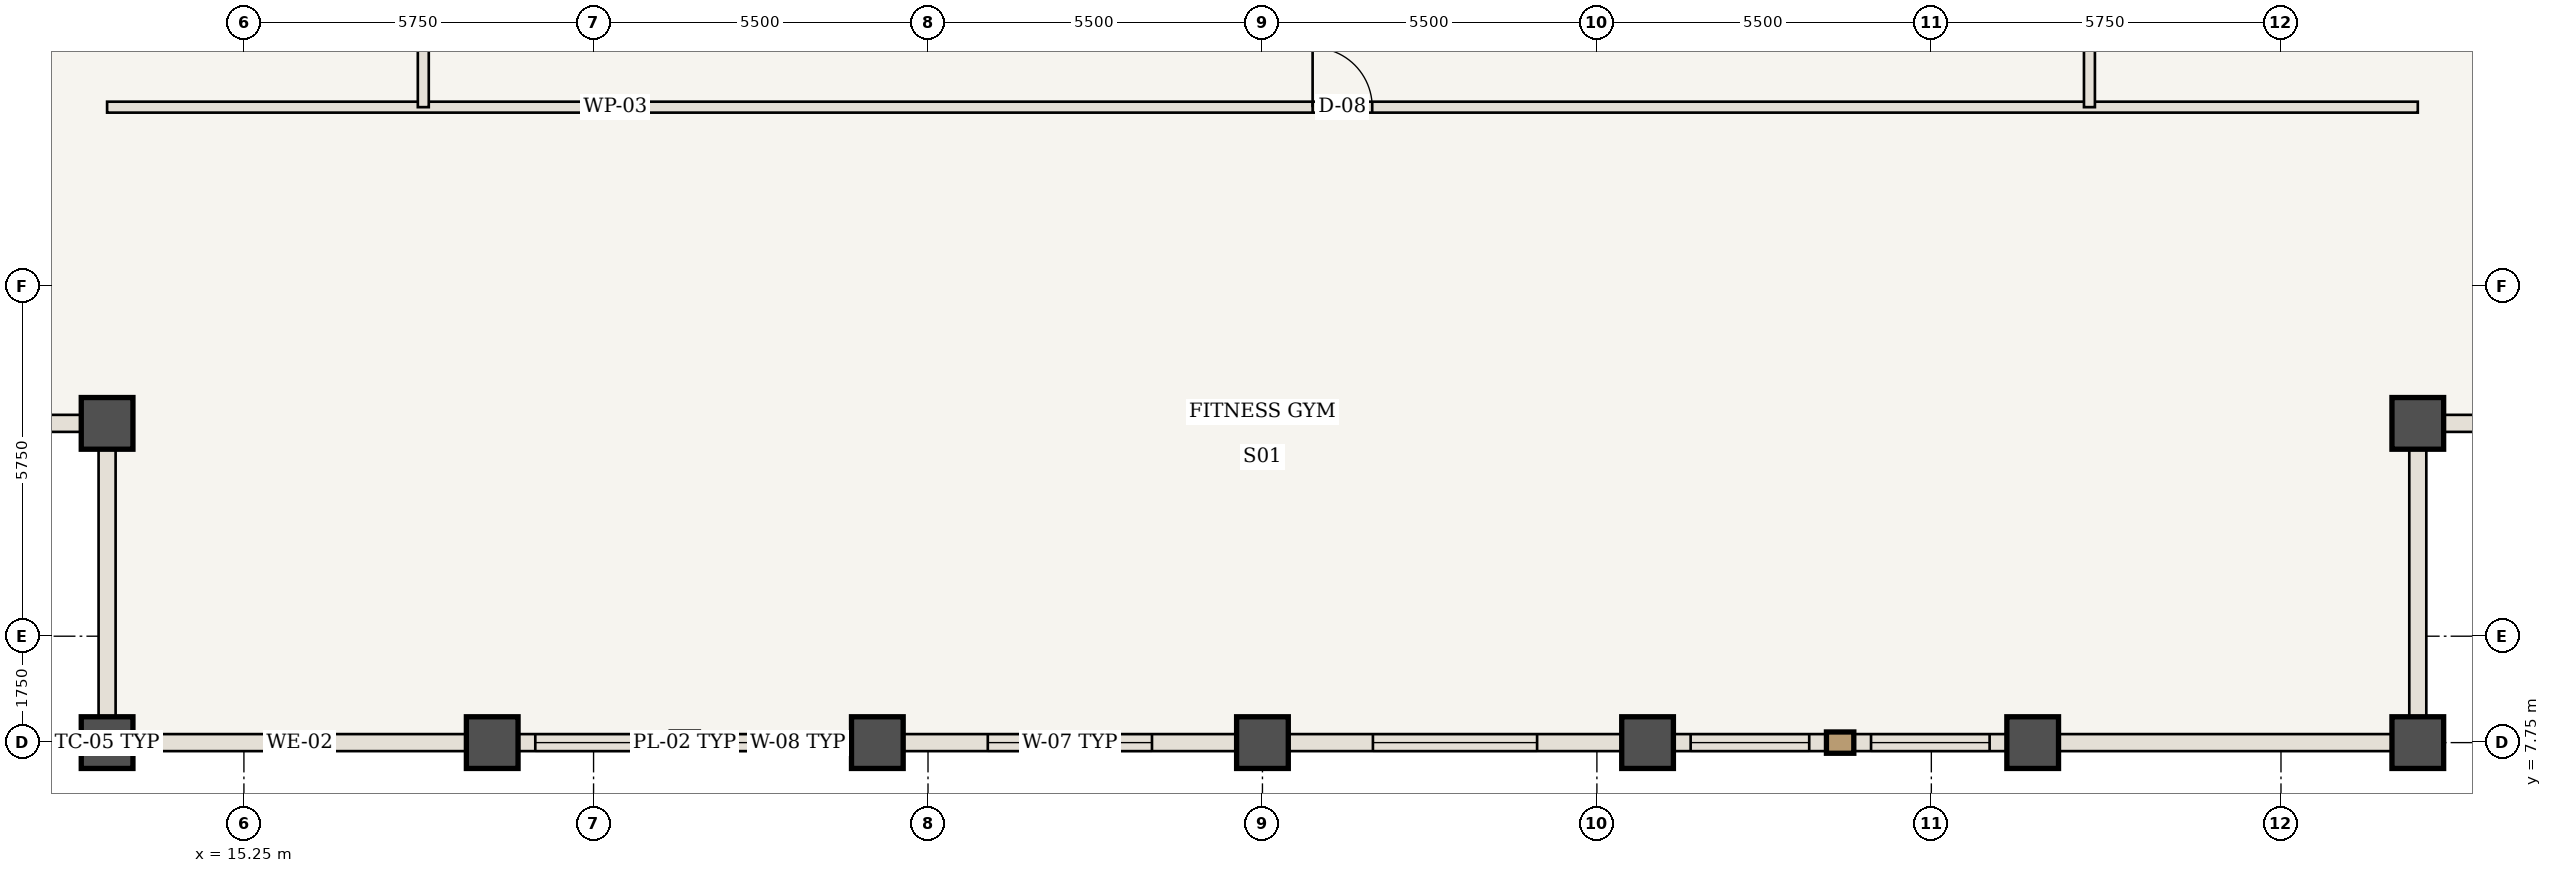
"""IFC4 building model, lengths in metres.
Left out: names, types, materials, properties, quantities, classifications, styles, units other than length and angle.
Written with IfcOpenShell. Run it as: python <this file> out.ifc"""

import sys

from ifc_helpers import new_model, si_unit, direction, frame, frame_2d, origin, origin_2d, place, context, subcontext, project, spatial, rectangle, extrude, element, fill, save


model = new_model("IFC4")
c1 = context("Model", 3, precision=1e-05, world=origin(), true_north=direction((0.0, 1.0)))
c2 = subcontext(c1, "Body", "Model", "MODEL_VIEW")
j1 = project(units=[si_unit("LENGTHUNIT", "METRE"), si_unit("PLANEANGLEUNIT", "RADIAN")], contexts=[c1])
p1 = place(None, origin())
s1 = spatial("IfcSite", under=j1, at=p1, CompositionType="ELEMENT")
p2 = place(p1, origin())
s2 = spatial("IfcBuilding", under=s1, at=p2, CompositionType="ELEMENT")
p3 = place(p2, frame((0.0, 0.0, 248.5)))
s3 = spatial("IfcBuildingStorey", under=s2, at=p3, CompositionType="ELEMENT", Elevation=248.5)
for number, where, z_axis, x_axis in (
    (1, (13.0, 7.75, 0.0), (0.0, 0.0, 1.0), (1.0, 0.0, 0.0)),
    (2, (13.0, 13.0, 0.0), (0.0, 0.0, 1.0), (1.0, 0.0, 0.0)),
    (3, (51.0, 7.75, 0.0), (0.0, 0.0, 1.0), (1.0, 0.0, 0.0)),
    (4, (51.0, 13.0, 0.0), (0.0, 0.0, 1.0), (1.0, 0.0, 0.0)),
    (5, (19.333, 7.75, 0.0), (0.0, 0.0, 1.0), (1.0, 0.0, 0.0)),
    (6, (25.667, 7.75, 0.0), (0.0, 0.0, 1.0), (1.0, 0.0, 0.0)),
    (7, (32.0, 7.75, 0.0), (0.0, 0.0, 1.0), (1.0, 0.0, 0.0)),
    (8, (38.333, 7.75, 0.0), (0.0, 0.0, 1.0), (1.0, 0.0, 0.0)),
    (9, (44.667, 7.75, 0.0), (0.0, 0.0, 1.0), (1.0, 0.0, 0.0)),
):
    element("IfcColumn", number, at=place(p3, frame(where, z_axis=z_axis, x_axis=x_axis)), inside=s3, PredefinedType="COLUMN", context=c2, shape_type="SweptSolid", body=[
        extrude(rectangle(XDim=0.85, YDim=0.85, at=origin_2d()), origin(), (0.0, 0.0, 1.0), 3.85),
    ])
p4 = place(p3, frame((13.0, 18.2, 0.0), z_axis=(0.0, 0.0, 1.0), x_axis=(1.0, 0.0, 0.0)))
e10 = element("IfcWall", 10, at=p4, inside=s3, PredefinedType="STANDARD", context=c2, shape_type="SweptSolid", body=[
    extrude(rectangle(XDim=38.0, YDim=0.18, at=frame_2d((19.0, 0.0))), origin(), (0.0, 0.0, 1.0), 3.43),
])
p5 = place(p4, frame((19.825, 0.0, 0.0)))
e11 = element("IfcOpeningElement", 11, at=p5, cuts=e10, PredefinedType="OPENING", context=c2, shape_type="SweptSolid", body=[
    extrude(rectangle(XDim=0.98, YDim=2.2, at=frame_2d((0.49, 1.1))), frame((0.0, 0.1, 0.0), z_axis=(0.0, -1.0, 0.0), x_axis=(1.0, 0.0, 0.0)), (0.0, 0.0, 1.0), 0.2),
])
p6 = place(p3, frame((18.2, 18.2, 0.0), z_axis=(0.0, 0.0, 1.0), x_axis=(0.0, 1.0, 0.0)))
e12 = element("IfcWall", 12, at=p6, inside=s3, PredefinedType="STANDARD", context=c2, shape_type="SweptSolid", body=[
    extrude(rectangle(XDim=27.6, YDim=0.18, at=frame_2d((13.8, 0.0))), origin(), (0.0, 0.0, 1.0), 3.43),
])
p7 = place(p6, frame((14.75, 0.0, 0.0)))
e13 = element("IfcOpeningElement", 13, at=p7, cuts=e12, PredefinedType="OPENING", context=c2, shape_type="SweptSolid", body=[
    extrude(rectangle(XDim=0.98, YDim=2.2, at=frame_2d((0.49, 1.1))), frame((0.0, 0.1, 0.0), z_axis=(0.0, -1.0, 0.0), x_axis=(1.0, 0.0, 0.0)), (0.0, 0.0, 1.0), 0.2),
])
p8 = place(p3, frame((45.6, 18.2, 0.0), z_axis=(0.0, 0.0, 1.0), x_axis=(0.0, 1.0, 0.0)))
e14 = element("IfcWall", 14, at=p8, inside=s3, PredefinedType="STANDARD", context=c2, shape_type="SweptSolid", body=[
    extrude(rectangle(XDim=12.55, YDim=0.18, at=frame_2d((6.275, 0.0))), origin(), (0.0, 0.0, 1.0), 3.43),
])
p9 = place(p8, frame((5.775, 0.0, 0.0)))
e15 = element("IfcOpeningElement", 15, at=p9, cuts=e14, PredefinedType="OPENING", context=c2, shape_type="SweptSolid", body=[
    extrude(rectangle(XDim=0.98, YDim=2.2, at=frame_2d((0.49, 1.1))), frame((0.0, 0.1, 0.0), z_axis=(0.0, -1.0, 0.0), x_axis=(1.0, 0.0, 0.0)), (0.0, 0.0, 1.0), 0.2),
])
p10 = place(p3, frame((19.333, 7.75, 0.0), z_axis=(0.0, 0.0, 1.0), x_axis=(-1.0, 0.0, 0.0)))
e16 = element("IfcWall", 16, at=p10, inside=s3, PredefinedType="USERDEFINED", context=c2, shape_type="SweptSolid", body=[
    extrude(rectangle(XDim=6.333, YDim=0.28, at=frame_2d((3.167, 0.0))), origin(), (0.0, 0.0, 1.0), 2.73),
])
p11 = place(p3, frame((25.667, 7.75, 0.0), z_axis=(0.0, 0.0, 1.0), x_axis=(-1.0, 0.0, 0.0)))
e17 = element("IfcWall", 17, at=p11, inside=s3, PredefinedType="USERDEFINED", context=c2, shape_type="SweptSolid", body=[
    extrude(rectangle(XDim=6.333, YDim=0.28, at=frame_2d((3.167, 0.0))), origin(), (0.0, 0.0, 1.0), 2.73),
])
p12 = place(p11, frame((0.708, 0.0, 0.85)))
e18 = element("IfcOpeningElement", 18, at=p12, cuts=e17, PredefinedType="OPENING", context=c2, shape_type="SweptSolid", body=[
    extrude(rectangle(XDim=1.95, YDim=1.68, at=frame_2d((0.975, 0.84))), frame((0.0, 0.15, 0.0), z_axis=(0.0, -1.0, 0.0), x_axis=(1.0, 0.0, 0.0)), (0.0, 0.0, 1.0), 0.3),
])
p13 = place(p11, frame((3.675, 0.0, 0.85)))
e19 = element("IfcOpeningElement", 19, at=p13, cuts=e17, PredefinedType="OPENING", context=c2, shape_type="SweptSolid", body=[
    extrude(rectangle(XDim=1.95, YDim=1.68, at=frame_2d((0.975, 0.84))), frame((0.0, 0.15, 0.0), z_axis=(0.0, -1.0, 0.0), x_axis=(1.0, 0.0, 0.0)), (0.0, 0.0, 1.0), 0.3),
])
p14 = place(p3, frame((32.0, 7.75, 0.0), z_axis=(0.0, 0.0, 1.0), x_axis=(-1.0, 0.0, 0.0)))
e20 = element("IfcWall", 20, at=p14, inside=s3, PredefinedType="USERDEFINED", context=c2, shape_type="SweptSolid", body=[
    extrude(rectangle(XDim=6.333, YDim=0.28, at=frame_2d((3.167, 0.0))), origin(), (0.0, 0.0, 1.0), 2.73),
])
p15 = place(p14, frame((1.817, 0.0, 0.85)))
e21 = element("IfcOpeningElement", 21, at=p15, cuts=e20, PredefinedType="OPENING", context=c2, shape_type="SweptSolid", body=[
    extrude(rectangle(XDim=2.7, YDim=1.68, at=frame_2d((1.35, 0.84))), frame((0.0, 0.15, 0.0), z_axis=(0.0, -1.0, 0.0), x_axis=(1.0, 0.0, 0.0)), (0.0, 0.0, 1.0), 0.3),
])
p16 = place(p3, frame((38.333, 7.75, 0.0), z_axis=(0.0, 0.0, 1.0), x_axis=(-1.0, 0.0, 0.0)))
e22 = element("IfcWall", 22, at=p16, inside=s3, PredefinedType="USERDEFINED", context=c2, shape_type="SweptSolid", body=[
    extrude(rectangle(XDim=6.333, YDim=0.28, at=frame_2d((3.167, 0.0))), origin(), (0.0, 0.0, 1.0), 2.73),
])
p17 = place(p16, frame((1.817, 0.0, 0.85)))
e23 = element("IfcOpeningElement", 23, at=p17, cuts=e22, PredefinedType="OPENING", context=c2, shape_type="SweptSolid", body=[
    extrude(rectangle(XDim=2.7, YDim=1.68, at=frame_2d((1.35, 0.84))), frame((0.0, 0.15, 0.0), z_axis=(0.0, -1.0, 0.0), x_axis=(1.0, 0.0, 0.0)), (0.0, 0.0, 1.0), 0.3),
])
p18 = place(p3, frame((44.667, 7.75, 0.0), z_axis=(0.0, 0.0, 1.0), x_axis=(-1.0, 0.0, 0.0)))
e24 = element("IfcWall", 24, at=p18, inside=s3, PredefinedType="USERDEFINED", context=c2, shape_type="SweptSolid", body=[
    extrude(rectangle(XDim=6.333, YDim=0.28, at=frame_2d((3.167, 0.0))), origin(), (0.0, 0.0, 1.0), 2.73),
])
p19 = place(p18, frame((0.708, 0.0, 0.85)))
e25 = element("IfcOpeningElement", 25, at=p19, cuts=e24, PredefinedType="OPENING", context=c2, shape_type="SweptSolid", body=[
    extrude(rectangle(XDim=1.95, YDim=1.68, at=frame_2d((0.975, 0.84))), frame((0.0, 0.15, 0.0), z_axis=(0.0, -1.0, 0.0), x_axis=(1.0, 0.0, 0.0)), (0.0, 0.0, 1.0), 0.3),
])
p20 = place(p18, frame((3.675, 0.0, 0.85)))
e26 = element("IfcOpeningElement", 26, at=p20, cuts=e24, PredefinedType="OPENING", context=c2, shape_type="SweptSolid", body=[
    extrude(rectangle(XDim=1.95, YDim=1.68, at=frame_2d((0.975, 0.84))), frame((0.0, 0.15, 0.0), z_axis=(0.0, -1.0, 0.0), x_axis=(1.0, 0.0, 0.0)), (0.0, 0.0, 1.0), 0.3),
])
p21 = place(p3, frame((51.0, 7.75, 0.0), z_axis=(0.0, 0.0, 1.0), x_axis=(-1.0, 0.0, 0.0)))
e27 = element("IfcWall", 27, at=p21, inside=s3, PredefinedType="USERDEFINED", context=c2, shape_type="SweptSolid", body=[
    extrude(rectangle(XDim=6.333, YDim=0.28, at=frame_2d((3.167, 0.0))), origin(), (0.0, 0.0, 1.0), 2.73),
])
for number, where, z_axis, x_axis in (
    (28, (13.0, 7.75, 0.0), (0.0, 0.0, 1.0), (0.0, 1.0, 0.0)),
    (29, (13.0, 13.0, 0.0), (0.0, 0.0, 1.0), (-1.0, 0.0, 0.0)),
    (30, (51.0, 13.0, 0.0), (0.0, 0.0, 1.0), (0.0, -1.0, 0.0)),
    (31, (56.25, 13.0, 0.0), (0.0, 0.0, 1.0), (-1.0, 0.0, 0.0)),
):
    element("IfcWall", number, at=place(p3, frame(where, z_axis=z_axis, x_axis=x_axis)), inside=s3, PredefinedType="USERDEFINED", context=c2, shape_type="SweptSolid", body=[
        extrude(rectangle(XDim=5.25, YDim=0.28, at=frame_2d((2.625, 0.0))), origin(), (0.0, 0.0, 1.0), 2.73),
    ])
p22 = place(p5, origin())
e32 = element("IfcDoor", 32, at=p22, inside=s3, OperationType="SINGLE_SWING_LEFT", PredefinedType="DOOR", context=c2, shape_type="SweptSolid", body=[
    extrude(rectangle(XDim=0.98, YDim=2.2, at=frame_2d((0.49, 1.1))), frame((0.0, 0.025, 0.0), z_axis=(0.0, -1.0, 0.0), x_axis=(1.0, 0.0, 0.0)), (0.0, 0.0, 1.0), 0.05),
])
fill(e11, e32)
p23 = place(p12, origin())
e33 = element("IfcWindow", 33, at=p23, inside=s3, PartitioningType="SINGLE_PANEL", PredefinedType="WINDOW", context=c2, shape_type="SweptSolid", body=[
    extrude(rectangle(XDim=1.95, YDim=1.68, at=frame_2d((0.975, 0.84))), frame((0.0, 0.03, 0.0), z_axis=(0.0, -1.0, 0.0), x_axis=(1.0, 0.0, 0.0)), (0.0, 0.0, 1.0), 0.06),
])
fill(e18, e33)
p24 = place(p13, origin())
e34 = element("IfcWindow", 34, at=p24, inside=s3, PartitioningType="SINGLE_PANEL", PredefinedType="WINDOW", context=c2, shape_type="SweptSolid", body=[
    extrude(rectangle(XDim=1.95, YDim=1.68, at=frame_2d((0.975, 0.84))), frame((0.0, 0.03, 0.0), z_axis=(0.0, -1.0, 0.0), x_axis=(1.0, 0.0, 0.0)), (0.0, 0.0, 1.0), 0.06),
])
fill(e19, e34)
p25 = place(p15, origin())
e35 = element("IfcWindow", 35, at=p25, inside=s3, PartitioningType="SINGLE_PANEL", PredefinedType="WINDOW", context=c2, shape_type="SweptSolid", body=[
    extrude(rectangle(XDim=2.7, YDim=1.68, at=frame_2d((1.35, 0.84))), frame((0.0, 0.03, 0.0), z_axis=(0.0, -1.0, 0.0), x_axis=(1.0, 0.0, 0.0)), (0.0, 0.0, 1.0), 0.06),
])
fill(e21, e35)
p26 = place(p17, origin())
e36 = element("IfcWindow", 36, at=p26, inside=s3, PartitioningType="SINGLE_PANEL", PredefinedType="WINDOW", context=c2, shape_type="SweptSolid", body=[
    extrude(rectangle(XDim=2.7, YDim=1.68, at=frame_2d((1.35, 0.84))), frame((0.0, 0.03, 0.0), z_axis=(0.0, -1.0, 0.0), x_axis=(1.0, 0.0, 0.0)), (0.0, 0.0, 1.0), 0.06),
])
fill(e23, e36)
p27 = place(p19, origin())
e37 = element("IfcWindow", 37, at=p27, inside=s3, PartitioningType="SINGLE_PANEL", PredefinedType="WINDOW", context=c2, shape_type="SweptSolid", body=[
    extrude(rectangle(XDim=1.95, YDim=1.68, at=frame_2d((0.975, 0.84))), frame((0.0, 0.03, 0.0), z_axis=(0.0, -1.0, 0.0), x_axis=(1.0, 0.0, 0.0)), (0.0, 0.0, 1.0), 0.06),
])
fill(e25, e37)
p28 = place(p20, origin())
e38 = element("IfcWindow", 38, at=p28, inside=s3, PartitioningType="SINGLE_PANEL", PredefinedType="WINDOW", context=c2, shape_type="SweptSolid", body=[
    extrude(rectangle(XDim=1.95, YDim=1.68, at=frame_2d((0.975, 0.84))), frame((0.0, 0.03, 0.0), z_axis=(0.0, -1.0, 0.0), x_axis=(1.0, 0.0, 0.0)), (0.0, 0.0, 1.0), 0.06),
])
fill(e26, e38)
save(model, sys.argv[1])
